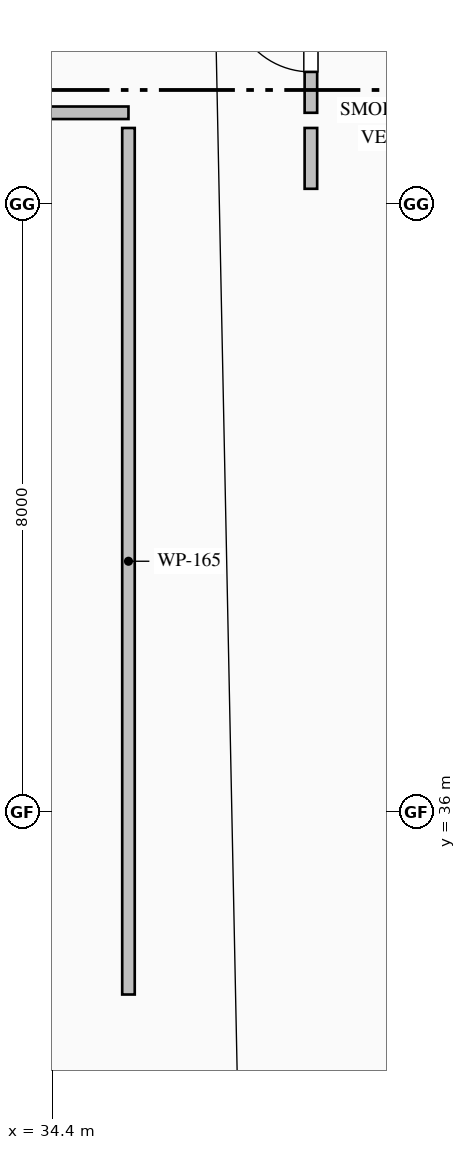
"""IFC4 building model, lengths in metres.
Left out: names, types, materials, properties, quantities, classifications, styles, units other than length and angle.
Written with IfcOpenShell. Run it as: python <this file> out.ifc"""

import sys

from ifc_helpers import new_model, si_unit, direction, frame, frame_2d, origin, place, context, subcontext, project, spatial, rectangle, extrude, element, fill, save


model = new_model("IFC4")
c1 = context("Model", 3, precision=1e-05, world=origin(), true_north=direction((0.0, 1.0)))
c2 = subcontext(c1, "Body", "Model", "MODEL_VIEW")
j1 = project(units=[si_unit("LENGTHUNIT", "METRE"), si_unit("PLANEANGLEUNIT", "RADIAN")], contexts=[c1])
p1 = place(None, origin())
s1 = spatial("IfcSite", under=j1, at=p1, CompositionType="ELEMENT")
p2 = place(p1, origin())
s2 = spatial("IfcBuilding", under=s1, at=p2, CompositionType="ELEMENT")
p3 = place(p2, frame((0.0, 0.0, 299.2)))
s3 = spatial("IfcBuildingStorey", under=s2, at=p3, CompositionType="ELEMENT", Elevation=299.2)
p4 = place(p3, frame((37.8, 45.2, 0.0), z_axis=(0.0, 0.0, 1.0), x_axis=(0.0, 1.0, 0.0)))
e1 = element("IfcWall", 1, at=p4, inside=s3, PredefinedType="PARTITIONING", context=c2, shape_type="SweptSolid", body=[
    extrude(rectangle(XDim=2.125, YDim=0.165, at=frame_2d((1.063, 0.0))), origin(), (0.0, 0.0, 1.0), 3.785),
])
p5 = place(p4, frame((0.538, 0.0, 0.0)))
e2 = element("IfcOpeningElement", 2, at=p5, cuts=e1, PredefinedType="OPENING", context=c2, shape_type="SweptSolid", body=[
    extrude(rectangle(XDim=1.05, YDim=2.15, at=frame_2d((0.525, 1.075))), frame((0.0, 0.093, 0.0), z_axis=(0.0, -1.0, 0.0), x_axis=(1.0, 0.0, 0.0)), (0.0, 0.0, 1.0), 0.185),
])
p6 = place(p3, frame((37.8, 44.2, 0.0), z_axis=(0.0, 0.0, 1.0), x_axis=(0.0, 1.0, 0.0)))
e3 = element("IfcWall", 3, at=p6, inside=s3, PredefinedType="PARTITIONING", context=c2, shape_type="SweptSolid", body=[
    extrude(rectangle(XDim=0.8, YDim=0.165, at=frame_2d((0.4, 0.0))), origin(), (0.0, 0.0, 1.0), 3.785),
])
p7 = place(p3, frame((35.4, 45.2, 0.0), z_axis=(0.0, 0.0, 1.0), x_axis=(-1.0, 0.0, 0.0)))
e4 = element("IfcWall", 4, at=p7, inside=s3, PredefinedType="PARTITIONING", context=c2, shape_type="SweptSolid", body=[
    extrude(rectangle(XDim=14.9, YDim=0.165, at=frame_2d((7.45, 0.0))), origin(), (0.0, 0.0, 1.0), 3.785),
])
p8 = place(p7, frame((6.95, 0.0, 0.0)))
e5 = element("IfcOpeningElement", 5, at=p8, cuts=e4, PredefinedType="OPENING", context=c2, shape_type="SweptSolid", body=[
    extrude(rectangle(XDim=1.0, YDim=2.15, at=frame_2d((0.5, 1.075))), frame((0.0, 0.093, 0.0), z_axis=(0.0, -1.0, 0.0), x_axis=(1.0, 0.0, 0.0)), (0.0, 0.0, 1.0), 0.185),
])
p9 = place(p3, frame((35.4, 33.6, 0.0), z_axis=(0.0, 0.0, 1.0), x_axis=(0.0, 1.0, 0.0)))
e6 = element("IfcWall", 6, at=p9, inside=s3, PredefinedType="PARTITIONING", context=c2, shape_type="SweptSolid", body=[
    extrude(rectangle(XDim=11.4, YDim=0.165, at=frame_2d((5.7, 0.0))), origin(), (0.0, 0.0, 1.0), 3.785),
])
p10 = place(p5, origin())
e7 = element("IfcDoor", 7, at=p10, inside=s3, OperationType="SINGLE_SWING_RIGHT", PredefinedType="DOOR", context=c2, shape_type="SweptSolid", body=[
    extrude(rectangle(XDim=1.05, YDim=2.15, at=frame_2d((0.525, 1.075))), frame((0.0, 0.025, 0.0), z_axis=(0.0, -1.0, 0.0), x_axis=(1.0, 0.0, 0.0)), (0.0, 0.0, 1.0), 0.05),
])
fill(e2, e7)
save(model, sys.argv[1])
